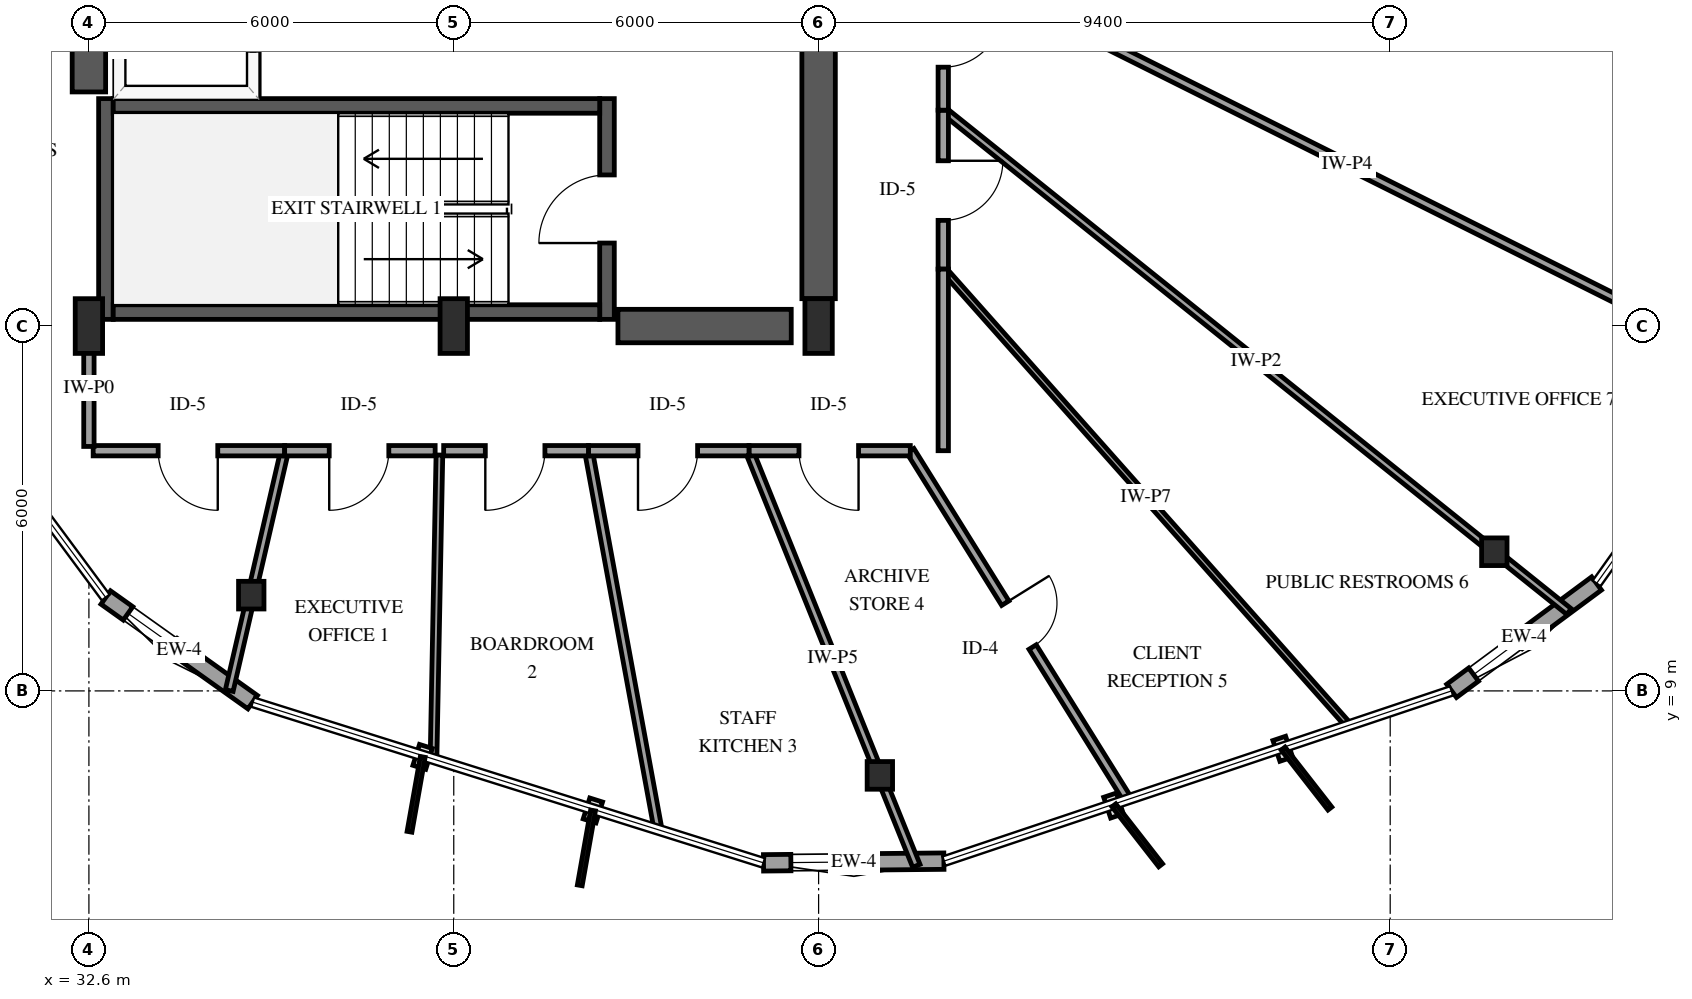
"""IFC4 building model, lengths in metres.
Left out: names, types, materials, properties, quantities, classifications, styles, units other than length and angle.
Written with IfcOpenShell. Run it as: python <this file> out.ifc"""

import sys

from ifc_helpers import new_model, si_unit, direction, frame, frame_2d, origin, origin_2d, place, context, subcontext, project, spatial, rectangle, i_section, extrude, element, fill, save


model = new_model("IFC4")
c1 = context("Model", 3, precision=1e-05, world=origin(), true_north=direction((0.0, 1.0)))
c2 = subcontext(c1, "Body", "Model", "MODEL_VIEW")
j1 = project(units=[si_unit("LENGTHUNIT", "METRE"), si_unit("PLANEANGLEUNIT", "RADIAN")], contexts=[c1])
p1 = place(None, origin())
s1 = spatial("IfcSite", under=j1, at=p1, CompositionType="ELEMENT")
p2 = place(p1, origin())
s2 = spatial("IfcBuilding", under=s1, at=p2, CompositionType="ELEMENT")
p3 = place(p2, frame((0.0, 0.0, 103.0)))
s3 = spatial("IfcBuildingStorey", under=s2, at=p3, CompositionType="ELEMENT", Elevation=103.0)
p4 = place(p3, frame((32.88, 15.11, 0.0), z_axis=(0.0, 0.0, 1.0), x_axis=(0.0, 1.0, 0.0)))
e1 = element("IfcWall", 1, at=p4, inside=s3, PredefinedType="SHEAR", context=c2, shape_type="SweptSolid", body=[
    extrude(rectangle(XDim=3.63, YDim=0.24, at=frame_2d((1.815, 0.0))), origin(), (0.0, 0.0, 1.0), 3.9),
])
p5 = place(p3, frame((41.12, 15.11, 0.0), z_axis=(0.0, 0.0, 1.0), x_axis=(0.0, 1.0, 0.0)))
e2 = element("IfcWall", 2, at=p5, inside=s3, PredefinedType="SHEAR", context=c2, shape_type="SweptSolid", body=[
    extrude(rectangle(XDim=3.63, YDim=0.24, at=frame_2d((1.815, 0.0))), origin(), (0.0, 0.0, 1.0), 3.9),
])
p6 = place(p5, frame((1.255, 0.0, 0.0)))
e3 = element("IfcOpeningElement", 3, at=p6, cuts=e2, PredefinedType="OPENING", context=c2, shape_type="SweptSolid", body=[
    extrude(rectangle(XDim=1.12, YDim=2.15, at=frame_2d((0.56, 1.075))), frame((0.0, 0.13, 0.0), z_axis=(0.0, -1.0, 0.0), x_axis=(1.0, 0.0, 0.0)), (0.0, 0.0, 1.0), 0.26),
])
for number, where, z_axis, x_axis in (
    (4, (33.0, 15.23, 0.0), (0.0, 0.0, 1.0), (1.0, 0.0, 0.0)),
    (5, (33.0, 18.62, 0.0), (0.0, 0.0, 1.0), (1.0, 0.0, 0.0)),
):
    element("IfcWall", number, at=place(p3, frame(where, z_axis=z_axis, x_axis=x_axis)), inside=s3, PredefinedType="SHEAR", context=c2, shape_type="SweptSolid", body=[
        extrude(rectangle(XDim=8.0, YDim=0.24, at=frame_2d((4.0, 0.0))), origin(), (0.0, 0.0, 1.0), 3.9),
    ])
p7 = place(p3, frame((32.6, 18.85, 0.0), z_axis=(0.0, 0.0, 1.0), x_axis=(0.0, 1.0, 0.0)))
e6 = element("IfcWall", 6, at=p7, inside=s3, PredefinedType="SHEAR", context=c2, shape_type="SweptSolid", body=[
    extrude(rectangle(XDim=12.3, YDim=0.55, at=frame_2d((6.15, 0.0))), origin(), (0.0, 0.0, 1.0), 3.9),
])
p8 = place(p3, frame((41.3, 15.0, 0.0), z_axis=(0.0, 0.0, 1.0), x_axis=(1.0, 0.0, 0.0)))
e7 = element("IfcWall", 7, at=p8, inside=s3, PredefinedType="SHEAR", context=c2, shape_type="SweptSolid", body=[
    extrude(rectangle(XDim=2.85, YDim=0.55, at=frame_2d((1.425, 0.0))), origin(), (0.0, 0.0, 1.0), 3.9),
])
p9 = place(p3, frame((44.6, 15.45, 0.0), z_axis=(0.0, 0.0, 1.0), x_axis=(0.0, 1.0, 0.0)))
e8 = element("IfcWall", 8, at=p9, inside=s3, PredefinedType="SHEAR", context=c2, shape_type="SweptSolid", body=[
    extrude(rectangle(XDim=6.35, YDim=0.55, at=frame_2d((3.175, 0.0))), origin(), (0.0, 0.0, 1.0), 3.9),
])
for number, where, z_axis, x_axis in (
    (9, (32.6, 15.0, 0.0), (0.0, 0.0, 1.0), (1.0, 0.0, 0.0)),
    (10, (38.6, 15.0, 0.0), (0.0, 0.0, 1.0), (1.0, 0.0, 0.0)),
    (11, (44.6, 15.0, 0.0), (0.0, 0.0, 1.0), (1.0, 0.0, 0.0)),
):
    element("IfcColumn", number, at=place(p3, frame(where, z_axis=z_axis, x_axis=x_axis)), inside=s3, PredefinedType="PILASTER", context=c2, shape_type="SweptSolid", body=[
        extrude(rectangle(XDim=0.45, YDim=0.9, at=origin_2d()), origin(), (0.0, 0.0, 1.0), 3.9),
    ])
for number, where, z_axis, x_axis in (
    (12, (35.27, 10.575, 0.0), (0.0, 0.0, 1.0), (1.0, 0.0, 0.0)),
    (13, (45.607, 7.611, 0.0), (0.0, 0.0, 1.0), (1.0, 0.0, 0.0)),
    (14, (55.712, 11.289, 0.0), (0.0, 0.0, 1.0), (1.0, 0.0, 0.0)),
):
    element("IfcColumn", number, at=place(p3, frame(where, z_axis=z_axis, x_axis=x_axis)), inside=s3, PredefinedType="COLUMN", context=c2, shape_type="SweptSolid", body=[
        extrude(i_section(OverallWidth=0.418, OverallDepth=0.455, WebThickness=0.042, FlangeThickness=0.068, FilletRadius=0.038, at=origin_2d()), origin(), (0.0, 0.0, 1.0), 3.9),
    ])
p10 = place(p3, frame((32.877, 10.536, 0.0), z_axis=(0.0, 0.0, 1.0), x_axis=(0.814483465487, -0.580186766867, 0.0)))
e15 = element("IfcWall", 15, at=p10, inside=s3, PredefinedType="SOLIDWALL", context=c2, shape_type="SweptSolid", body=[
    extrude(rectangle(XDim=2.967, YDim=0.27, at=frame_2d((1.483, 0.0))), origin(), (0.0, 0.0, 1.0), 2.979),
])
p11 = place(p10, frame((0.45, 0.0, 0.75)))
e16 = element("IfcOpeningElement", 16, at=p11, cuts=e15, PredefinedType="OPENING", context=c2, shape_type="SweptSolid", body=[
    extrude(rectangle(XDim=0.9, YDim=1.5, at=frame_2d((0.45, 0.75))), frame((0.0, 0.145, 0.0), z_axis=(0.0, -1.0, 0.0), x_axis=(1.0, 0.0, 0.0)), (0.0, 0.0, 1.0), 0.29),
])
p12 = place(p3, frame((43.694, 6.173, 0.0), z_axis=(0.0, 0.0, 1.0), x_axis=(0.999955985226, 0.009382303071, 0.0)))
e17 = element("IfcWall", 17, at=p12, inside=s3, PredefinedType="SOLIDWALL", context=c2, shape_type="SweptSolid", body=[
    extrude(rectangle(XDim=2.967, YDim=0.27, at=frame_2d((1.483, 0.0))), origin(), (0.0, 0.0, 1.0), 2.979),
])
p13 = place(p12, frame((0.45, 0.0, 0.75)))
e18 = element("IfcOpeningElement", 18, at=p13, cuts=e17, PredefinedType="OPENING", context=c2, shape_type="SweptSolid", body=[
    extrude(rectangle(XDim=0.9, YDim=1.5, at=frame_2d((0.45, 0.75))), frame((0.0, 0.145, 0.0), z_axis=(0.0, -1.0, 0.0), x_axis=(1.0, 0.0, 0.0)), (0.0, 0.0, 1.0), 0.29),
])
p14 = place(p3, frame((55.01, 9.0, 0.0), z_axis=(0.0, 0.0, 1.0), x_axis=(0.803433261612, 0.595394822059, 0.0)))
e19 = element("IfcWall", 19, at=p14, inside=s3, PredefinedType="SOLIDWALL", context=c2, shape_type="SweptSolid", body=[
    extrude(rectangle(XDim=2.967, YDim=0.27, at=frame_2d((1.483, 0.0))), origin(), (0.0, 0.0, 1.0), 2.979),
])
p15 = place(p14, frame((0.45, 0.0, 0.75)))
e20 = element("IfcOpeningElement", 20, at=p15, cuts=e19, PredefinedType="OPENING", context=c2, shape_type="SweptSolid", body=[
    extrude(rectangle(XDim=0.9, YDim=1.5, at=frame_2d((0.45, 0.75))), frame((0.0, 0.145, 0.0), z_axis=(0.0, -1.0, 0.0), x_axis=(1.0, 0.0, 0.0)), (0.0, 0.0, 1.0), 0.29),
])
p16 = place(p3, frame((35.3, 18.79, 0.0), z_axis=(0.0, 0.0, 1.0), x_axis=(0.0, 1.0, 0.0)))
e21 = element("IfcWall", 21, at=p16, inside=s3, PredefinedType="SOLIDWALL", context=c2, shape_type="SweptSolid", body=[
    extrude(rectangle(XDim=2.55, YDim=0.2, at=frame_2d((1.275, 0.0))), origin(), (0.0, 0.0, 1.0), 3.6),
])
p17 = place(p16, frame((0.725, 0.0, 0.0)))
e22 = element("IfcOpeningElement", 22, at=p17, cuts=e21, PredefinedType="OPENING", context=c2, shape_type="SweptSolid", body=[
    extrude(rectangle(XDim=1.1, YDim=2.15, at=frame_2d((0.55, 1.075))), frame((0.0, 0.11, 0.0), z_axis=(0.0, -1.0, 0.0), x_axis=(1.0, 0.0, 0.0)), (0.0, 0.0, 1.0), 0.22),
])
p18 = place(p3, frame((46.65, 20.975, 0.0), z_axis=(0.0, 0.0, 1.0), x_axis=(0.894492933533, -0.447082086266, 0.0)))
e23 = element("IfcWall", 23, at=p18, inside=s3, PredefinedType="PARTITIONING", context=c2, shape_type="SweptSolid", body=[
    extrude(rectangle(XDim=14.852, YDim=0.14, at=frame_2d((7.426, 0.0))), origin(), (0.0, 0.0, 1.0), 3.6),
])
p19 = place(p3, frame((46.65, 18.55, 0.0), z_axis=(0.0, 0.0, 1.0), x_axis=(0.780384466618, -0.625299995412, 0.0)))
e24 = element("IfcWall", 24, at=p19, inside=s3, PredefinedType="PARTITIONING", context=c2, shape_type="SweptSolid", body=[
    extrude(rectangle(XDim=13.186, YDim=0.12, at=frame_2d((6.593, 0.0))), origin(), (0.0, 0.0, 1.0), 2.978),
])
p20 = place(p3, frame((46.65, 15.936, 0.0), z_axis=(0.0, 0.0, 1.0), x_axis=(0.664067862616, -0.747672303781, 0.0)))
e25 = element("IfcWall", 25, at=p20, inside=s3, PredefinedType="PARTITIONING", context=c2, shape_type="SweptSolid", body=[
    extrude(rectangle(XDim=10.037, YDim=0.1, at=frame_2d((5.018, 0.0))), origin(), (0.0, 0.0, 1.0), 2.978),
])
p21 = place(p3, frame((43.455, 12.95, 0.0), z_axis=(0.0, 0.0, 1.0), x_axis=(0.373917251642, -0.927462068725, 0.0)))
e26 = element("IfcWall", 26, at=p21, inside=s3, PredefinedType="PARTITIONING", context=c2, shape_type="SweptSolid", body=[
    extrude(rectangle(XDim=7.36, YDim=0.13, at=frame_2d((3.68, 0.0))), origin(), (0.0, 0.0, 1.0), 2.895),
])
p22 = place(p3, frame((46.108, 12.95, 0.0), z_axis=(0.0, 0.0, 1.0), x_axis=(0.528835943062, -0.848724069015, 0.0)))
e27 = element("IfcWall", 27, at=p22, inside=s3, PredefinedType="PARTITIONING", context=c2, shape_type="SweptSolid", body=[
    extrude(rectangle(XDim=6.758, YDim=0.14, at=frame_2d((3.379, 0.0))), origin(), (0.0, 0.0, 1.0), 3.6),
])
p23 = place(p22, frame((2.954, 0.0, 0.0)))
e28 = element("IfcOpeningElement", 28, at=p23, cuts=e27, PredefinedType="OPENING", context=c2, shape_type="SweptSolid", body=[
    extrude(rectangle(XDim=0.85, YDim=2.1, at=frame_2d((0.425, 1.05))), frame((0.0, 0.08, 0.0), z_axis=(0.0, -1.0, 0.0), x_axis=(1.0, 0.0, 0.0)), (0.0, 0.0, 1.0), 0.16),
])
p24 = place(p3, frame((40.815, 12.95, 0.0), z_axis=(0.0, 0.0, 1.0), x_axis=(0.180709331702, -0.98353654606, 0.0)))
e29 = element("IfcWall", 29, at=p24, inside=s3, PredefinedType="PARTITIONING", context=c2, shape_type="SweptSolid", body=[
    extrude(rectangle(XDim=6.336, YDim=0.13, at=frame_2d((3.168, 0.0))), origin(), (0.0, 0.0, 1.0), 3.6),
])
p25 = place(p3, frame((32.6, 21.411, 0.0), z_axis=(0.0, 0.0, 1.0), x_axis=(-0.85825649037, -0.513221001848, 0.0)))
e30 = element("IfcWall", 30, at=p25, inside=s3, PredefinedType="PARTITIONING", context=c2, shape_type="SweptSolid", body=[
    extrude(rectangle(XDim=6.171, YDim=0.12, at=frame_2d((3.085, 0.0))), origin(), (0.0, 0.0, 1.0), 3.6),
])
p26 = place(p3, frame((38.364, 12.879, 0.0), z_axis=(0.0, 0.0, 1.0), x_axis=(-0.019384909246, -0.999812094993, 0.0)))
e31 = element("IfcWall", 31, at=p26, inside=s3, PredefinedType="PARTITIONING", context=c2, shape_type="SweptSolid", body=[
    extrude(rectangle(XDim=5.0, YDim=0.11, at=frame_2d((2.5, 0.0))), origin(), (0.0, 0.0, 1.0), 3.6),
])
p27 = place(p3, frame((35.819, 12.95, 0.0), z_axis=(0.0, 0.0, 1.0), x_axis=(-0.22509737341, -0.974336272795, 0.0)))
e32 = element("IfcWall", 32, at=p27, inside=s3, PredefinedType="PARTITIONING", context=c2, shape_type="SweptSolid", body=[
    extrude(rectangle(XDim=4.048, YDim=0.13, at=frame_2d((2.024, 0.0))), origin(), (0.0, 0.0, 1.0), 2.895),
])
p28 = place(p3, frame((35.819, 12.95, 0.0), z_axis=(0.0, 0.0, 1.0), x_axis=(-1.0, 0.0, 0.0)))
e33 = element("IfcWall", 33, at=p28, inside=s3, PredefinedType="PARTITIONING", context=c2, shape_type="SweptSolid", body=[
    extrude(rectangle(XDim=3.149, YDim=0.17, at=frame_2d((1.575, 0.0))), origin(), (0.0, 0.0, 1.0), 3.6),
])
p29 = place(p28, frame((1.1, 0.0, 0.0)))
e34 = element("IfcOpeningElement", 34, at=p29, cuts=e33, PredefinedType="OPENING", context=c2, shape_type="SweptSolid", body=[
    extrude(rectangle(XDim=0.98, YDim=2.15, at=frame_2d((0.49, 1.075))), frame((0.0, 0.095, 0.0), z_axis=(0.0, -1.0, 0.0), x_axis=(1.0, 0.0, 0.0)), (0.0, 0.0, 1.0), 0.19),
])
p30 = place(p3, frame((46.108, 12.95, 0.0), z_axis=(0.0, 0.0, 1.0), x_axis=(-1.0, 0.0, 0.0)))
e35 = element("IfcWall", 35, at=p30, inside=s3, PredefinedType="PARTITIONING", context=c2, shape_type="SweptSolid", body=[
    extrude(rectangle(XDim=2.653, YDim=0.17, at=frame_2d((1.326, 0.0))), origin(), (0.0, 0.0, 1.0), 3.6),
])
p31 = place(p30, frame((0.851, 0.0, 0.0)))
e36 = element("IfcOpeningElement", 36, at=p31, cuts=e35, PredefinedType="OPENING", context=c2, shape_type="SweptSolid", body=[
    extrude(rectangle(XDim=0.98, YDim=2.15, at=frame_2d((0.49, 1.075))), frame((0.0, 0.095, 0.0), z_axis=(0.0, -1.0, 0.0), x_axis=(1.0, 0.0, 0.0)), (0.0, 0.0, 1.0), 0.19),
])
p32 = place(p3, frame((43.455, 12.95, 0.0), z_axis=(0.0, 0.0, 1.0), x_axis=(-1.0, 0.0, 0.0)))
e37 = element("IfcWall", 37, at=p32, inside=s3, PredefinedType="PARTITIONING", context=c2, shape_type="SweptSolid", body=[
    extrude(rectangle(XDim=2.64, YDim=0.17, at=frame_2d((1.32, 0.0))), origin(), (0.0, 0.0, 1.0), 3.6),
])
p33 = place(p32, frame((0.845, 0.0, 0.0)))
e38 = element("IfcOpeningElement", 38, at=p33, cuts=e37, PredefinedType="OPENING", context=c2, shape_type="SweptSolid", body=[
    extrude(rectangle(XDim=0.98, YDim=2.15, at=frame_2d((0.49, 1.075))), frame((0.0, 0.095, 0.0), z_axis=(0.0, -1.0, 0.0), x_axis=(1.0, 0.0, 0.0)), (0.0, 0.0, 1.0), 0.19),
])
p34 = place(p3, frame((46.65, 18.55, 0.0), z_axis=(0.0, 0.0, 1.0), x_axis=(0.0, -1.0, 0.0)))
e39 = element("IfcWall", 39, at=p34, inside=s3, PredefinedType="PARTITIONING", context=c2, shape_type="SweptSolid", body=[
    extrude(rectangle(XDim=2.614, YDim=0.17, at=frame_2d((1.307, 0.0))), origin(), (0.0, 0.0, 1.0), 3.6),
])
p35 = place(p34, frame((0.832, 0.0, 0.0)))
e40 = element("IfcOpeningElement", 40, at=p35, cuts=e39, PredefinedType="OPENING", context=c2, shape_type="SweptSolid", body=[
    extrude(rectangle(XDim=0.98, YDim=2.15, at=frame_2d((0.49, 1.075))), frame((0.0, 0.095, 0.0), z_axis=(0.0, -1.0, 0.0), x_axis=(1.0, 0.0, 0.0)), (0.0, 0.0, 1.0), 0.19),
])
p36 = place(p3, frame((38.294, 12.95, 0.0), z_axis=(0.0, 0.0, 1.0), x_axis=(-1.0, 0.0, 0.0)))
e41 = element("IfcWall", 41, at=p36, inside=s3, PredefinedType="PARTITIONING", context=c2, shape_type="SweptSolid", body=[
    extrude(rectangle(XDim=2.475, YDim=0.17, at=frame_2d((1.237, 0.0))), origin(), (0.0, 0.0, 1.0), 3.6),
])
p37 = place(p36, frame((0.762, 0.0, 0.0)))
e42 = element("IfcOpeningElement", 42, at=p37, cuts=e41, PredefinedType="OPENING", context=c2, shape_type="SweptSolid", body=[
    extrude(rectangle(XDim=0.98, YDim=2.15, at=frame_2d((0.49, 1.075))), frame((0.0, 0.095, 0.0), z_axis=(0.0, -1.0, 0.0), x_axis=(1.0, 0.0, 0.0)), (0.0, 0.0, 1.0), 0.19),
])
p38 = place(p3, frame((46.65, 20.975, 0.0), z_axis=(0.0, 0.0, 1.0), x_axis=(0.0, -1.0, 0.0)))
e43 = element("IfcWall", 43, at=p38, inside=s3, PredefinedType="PARTITIONING", context=c2, shape_type="SweptSolid", body=[
    extrude(rectangle(XDim=2.425, YDim=0.17, at=frame_2d((1.212, 0.0))), origin(), (0.0, 0.0, 1.0), 3.6),
])
p39 = place(p38, frame((0.738, 0.0, 0.0)))
e44 = element("IfcOpeningElement", 44, at=p39, cuts=e43, PredefinedType="OPENING", context=c2, shape_type="SweptSolid", body=[
    extrude(rectangle(XDim=0.98, YDim=2.15, at=frame_2d((0.49, 1.075))), frame((0.0, 0.095, 0.0), z_axis=(0.0, -1.0, 0.0), x_axis=(1.0, 0.0, 0.0)), (0.0, 0.0, 1.0), 0.19),
])
p40 = place(p3, frame((40.815, 12.95, 0.0), z_axis=(0.0, 0.0, 1.0), x_axis=(-1.0, 0.0, 0.0)))
e45 = element("IfcWall", 45, at=p40, inside=s3, PredefinedType="PARTITIONING", context=c2, shape_type="SweptSolid", body=[
    extrude(rectangle(XDim=2.381, YDim=0.17, at=frame_2d((1.19, 0.0))), origin(), (0.0, 0.0, 1.0), 3.6),
])
p41 = place(p40, frame((0.716, 0.0, 0.0)))
e46 = element("IfcOpeningElement", 46, at=p41, cuts=e45, PredefinedType="OPENING", context=c2, shape_type="SweptSolid", body=[
    extrude(rectangle(XDim=0.98, YDim=2.15, at=frame_2d((0.49, 1.075))), frame((0.0, 0.095, 0.0), z_axis=(0.0, -1.0, 0.0), x_axis=(1.0, 0.0, 0.0)), (0.0, 0.0, 1.0), 0.19),
])
p42 = place(p3, frame((32.6, 13.02, 0.0), z_axis=(0.0, 0.0, 1.0), x_axis=(0.0, 1.0, 0.0)))
e47 = element("IfcWall", 47, at=p42, inside=s3, PredefinedType="PARTITIONING", context=c2, shape_type="SweptSolid", body=[
    extrude(rectangle(XDim=1.91, YDim=0.17, at=frame_2d((0.955, 0.0))), origin(), (0.0, 0.0, 1.0), 3.6),
])
p43 = place(p3, frame((46.65, 15.936, 0.0), z_axis=(0.0, 0.0, 1.0), x_axis=(0.0, -1.0, 0.0)))
e48 = element("IfcWall", 48, at=p43, inside=s3, PredefinedType="PARTITIONING", context=c2, shape_type="SweptSolid", body=[
    extrude(rectangle(XDim=2.986, YDim=0.17, at=frame_2d((1.493, 0.0))), origin(), (0.0, 0.0, 1.0), 3.6),
])
p44 = place(p11, origin())
e49 = element("IfcWindow", 49, at=p44, inside=s3, PartitioningType="SINGLE_PANEL", PredefinedType="WINDOW", context=c2, shape_type="SweptSolid", body=[
    extrude(rectangle(XDim=0.9, YDim=1.5, at=frame_2d((0.45, 0.75))), frame((0.0, 0.03, 0.0), z_axis=(0.0, -1.0, 0.0), x_axis=(1.0, 0.0, 0.0)), (0.0, 0.0, 1.0), 0.06),
])
fill(e16, e49)
p45 = place(p13, origin())
e50 = element("IfcWindow", 50, at=p45, inside=s3, PartitioningType="SINGLE_PANEL", PredefinedType="WINDOW", context=c2, shape_type="SweptSolid", body=[
    extrude(rectangle(XDim=0.9, YDim=1.5, at=frame_2d((0.45, 0.75))), frame((0.0, 0.03, 0.0), z_axis=(0.0, -1.0, 0.0), x_axis=(1.0, 0.0, 0.0)), (0.0, 0.0, 1.0), 0.06),
])
fill(e18, e50)
p46 = place(p15, origin())
e51 = element("IfcWindow", 51, at=p46, inside=s3, PartitioningType="SINGLE_PANEL", PredefinedType="WINDOW", context=c2, shape_type="SweptSolid", body=[
    extrude(rectangle(XDim=0.9, YDim=1.5, at=frame_2d((0.45, 0.75))), frame((0.0, 0.03, 0.0), z_axis=(0.0, -1.0, 0.0), x_axis=(1.0, 0.0, 0.0)), (0.0, 0.0, 1.0), 0.06),
])
fill(e20, e51)
p47 = place(p6, origin())
e52 = element("IfcDoor", 52, at=p47, inside=s3, OperationType="SINGLE_SWING_LEFT", PredefinedType="DOOR", context=c2, shape_type="SweptSolid", body=[
    extrude(rectangle(XDim=1.12, YDim=2.15, at=frame_2d((0.56, 1.075))), frame((0.0, 0.025, 0.0), z_axis=(0.0, -1.0, 0.0), x_axis=(1.0, 0.0, 0.0)), (0.0, 0.0, 1.0), 0.05),
])
fill(e3, e52)
p48 = place(p23, origin())
e53 = element("IfcDoor", 53, at=p48, inside=s3, OperationType="SINGLE_SWING_LEFT", PredefinedType="DOOR", context=c2, shape_type="SweptSolid", body=[
    extrude(rectangle(XDim=0.85, YDim=2.1, at=frame_2d((0.425, 1.05))), frame((0.0, 0.025, 0.0), z_axis=(0.0, -1.0, 0.0), x_axis=(1.0, 0.0, 0.0)), (0.0, 0.0, 1.0), 0.05),
])
fill(e28, e53)
p49 = place(p29, origin())
e54 = element("IfcDoor", 54, at=p49, inside=s3, OperationType="SINGLE_SWING_LEFT", PredefinedType="DOOR", context=c2, shape_type="SweptSolid", body=[
    extrude(rectangle(XDim=0.98, YDim=2.15, at=frame_2d((0.49, 1.075))), frame((0.0, 0.025, 0.0), z_axis=(0.0, -1.0, 0.0), x_axis=(1.0, 0.0, 0.0)), (0.0, 0.0, 1.0), 0.05),
])
fill(e34, e54)
p50 = place(p31, origin())
e55 = element("IfcDoor", 55, at=p50, inside=s3, OperationType="SINGLE_SWING_LEFT", PredefinedType="DOOR", context=c2, shape_type="SweptSolid", body=[
    extrude(rectangle(XDim=0.98, YDim=2.15, at=frame_2d((0.49, 1.075))), frame((0.0, 0.025, 0.0), z_axis=(0.0, -1.0, 0.0), x_axis=(1.0, 0.0, 0.0)), (0.0, 0.0, 1.0), 0.05),
])
fill(e36, e55)
p51 = place(p33, origin())
e56 = element("IfcDoor", 56, at=p51, inside=s3, OperationType="SINGLE_SWING_RIGHT", PredefinedType="DOOR", context=c2, shape_type="SweptSolid", body=[
    extrude(rectangle(XDim=0.98, YDim=2.15, at=frame_2d((0.49, 1.075))), frame((0.0, 0.025, 0.0), z_axis=(0.0, -1.0, 0.0), x_axis=(1.0, 0.0, 0.0)), (0.0, 0.0, 1.0), 0.05),
])
fill(e38, e56)
p52 = place(p35, origin())
e57 = element("IfcDoor", 57, at=p52, inside=s3, OperationType="SINGLE_SWING_LEFT", PredefinedType="DOOR", context=c2, shape_type="SweptSolid", body=[
    extrude(rectangle(XDim=0.98, YDim=2.15, at=frame_2d((0.49, 1.075))), frame((0.0, 0.025, 0.0), z_axis=(0.0, -1.0, 0.0), x_axis=(1.0, 0.0, 0.0)), (0.0, 0.0, 1.0), 0.05),
])
fill(e40, e57)
p53 = place(p37, origin())
e58 = element("IfcDoor", 58, at=p53, inside=s3, OperationType="SINGLE_SWING_RIGHT", PredefinedType="DOOR", context=c2, shape_type="SweptSolid", body=[
    extrude(rectangle(XDim=0.98, YDim=2.15, at=frame_2d((0.49, 1.075))), frame((0.0, 0.025, 0.0), z_axis=(0.0, -1.0, 0.0), x_axis=(1.0, 0.0, 0.0)), (0.0, 0.0, 1.0), 0.05),
])
fill(e42, e58)
p54 = place(p39, origin())
e59 = element("IfcDoor", 59, at=p54, inside=s3, OperationType="SINGLE_SWING_LEFT", PredefinedType="DOOR", context=c2, shape_type="SweptSolid", body=[
    extrude(rectangle(XDim=0.98, YDim=2.15, at=frame_2d((0.49, 1.075))), frame((0.0, 0.025, 0.0), z_axis=(0.0, -1.0, 0.0), x_axis=(1.0, 0.0, 0.0)), (0.0, 0.0, 1.0), 0.05),
])
fill(e44, e59)
p55 = place(p41, origin())
e60 = element("IfcDoor", 60, at=p55, inside=s3, OperationType="SINGLE_SWING_RIGHT", PredefinedType="DOOR", context=c2, shape_type="SweptSolid", body=[
    extrude(rectangle(XDim=0.98, YDim=2.15, at=frame_2d((0.49, 1.075))), frame((0.0, 0.025, 0.0), z_axis=(0.0, -1.0, 0.0), x_axis=(1.0, 0.0, 0.0)), (0.0, 0.0, 1.0), 0.05),
])
fill(e46, e60)
save(model, sys.argv[1])
